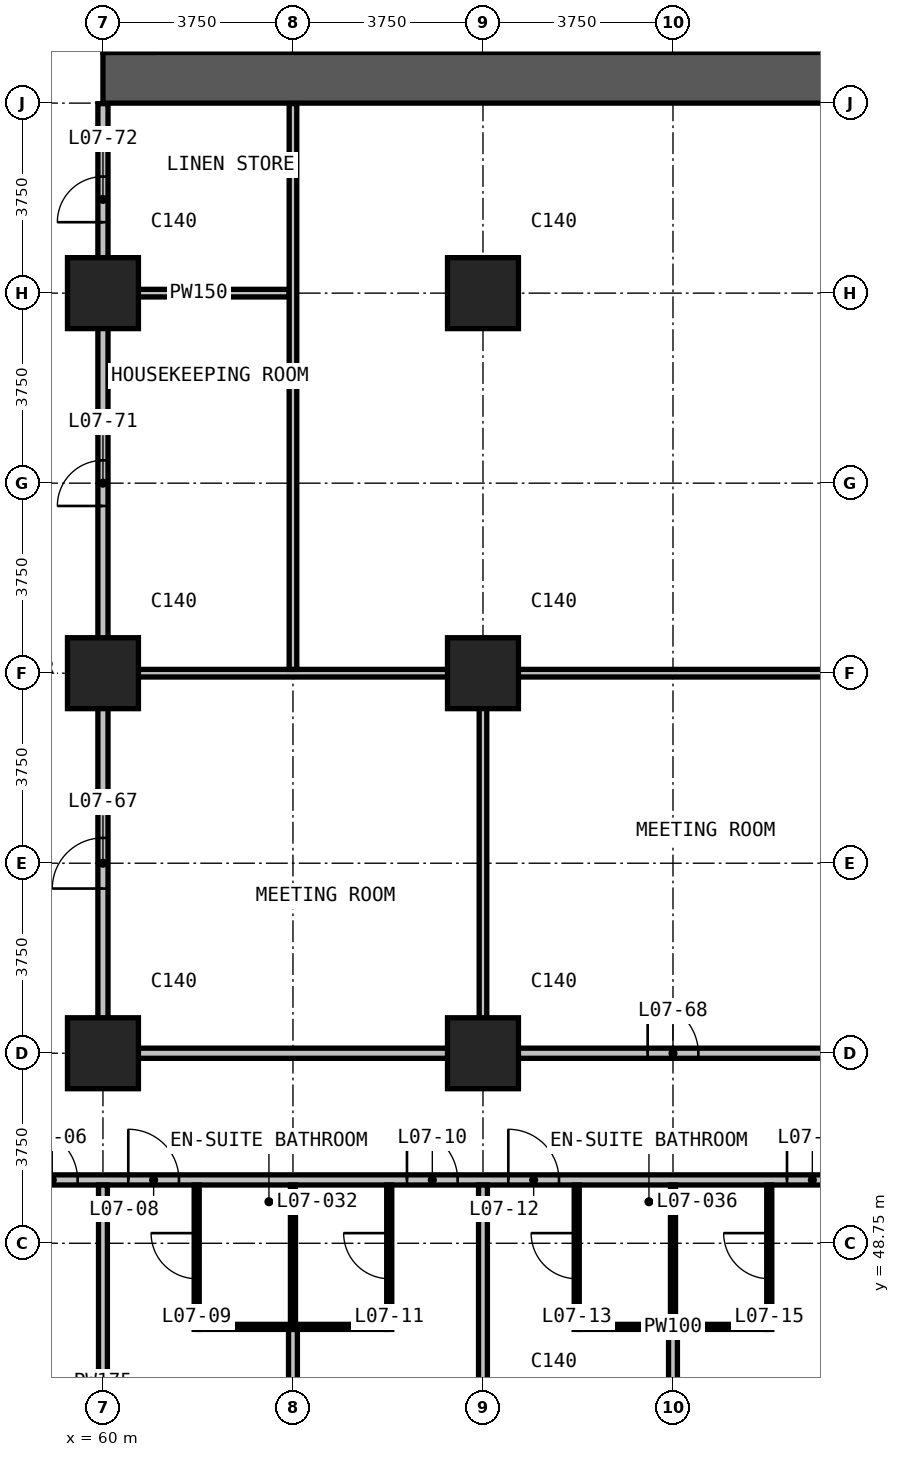
"""IFC4 building model, lengths in metres.
Left out: names, types, materials, properties, quantities, classifications, styles, units other than length and angle.
Written with IfcOpenShell. Run it as: python <this file> out.ifc"""

import sys

from ifc_helpers import new_model, si_unit, direction, frame, frame_2d, origin, origin_2d, place, context, subcontext, project, spatial, rectangle, extrude, element, fill, save


model = new_model("IFC4")
c1 = context("Model", 3, precision=1e-05, world=origin(), true_north=direction((0.0, 1.0)))
c2 = subcontext(c1, "Body", "Model", "MODEL_VIEW")
j1 = project(units=[si_unit("LENGTHUNIT", "METRE"), si_unit("PLANEANGLEUNIT", "RADIAN")], contexts=[c1])
p1 = place(None, origin())
s1 = spatial("IfcSite", under=j1, at=p1, CompositionType="ELEMENT")
p2 = place(p1, origin())
s2 = spatial("IfcBuilding", under=s1, at=p2, CompositionType="ELEMENT")
p3 = place(p2, frame((0.0, 0.0, 42.8)))
s3 = spatial("IfcBuildingStorey", under=s2, at=p3, CompositionType="ELEMENT", Elevation=42.8)
for number, where, z_axis, x_axis in (
    (1, (60.0, 52.5, 0.0), (0.0, 0.0, 1.0), (1.0, 0.0, 0.0)),
    (2, (60.0, 60.0, 0.0), (0.0, 0.0, 1.0), (1.0, 0.0, 0.0)),
    (3, (60.0, 67.5, 0.0), (0.0, 0.0, 1.0), (1.0, 0.0, 0.0)),
    (4, (67.5, 52.5, 0.0), (0.0, 0.0, 1.0), (1.0, 0.0, 0.0)),
    (5, (67.5, 60.0, 0.0), (0.0, 0.0, 1.0), (1.0, 0.0, 0.0)),
    (6, (67.5, 67.5, 0.0), (0.0, 0.0, 1.0), (1.0, 0.0, 0.0)),
):
    element("IfcColumn", number, at=place(p3, frame(where, z_axis=z_axis, x_axis=x_axis)), inside=s3, PredefinedType="COLUMN", context=c2, shape_type="SweptSolid", body=[
        extrude(rectangle(XDim=1.4, YDim=1.4, at=origin_2d()), origin(), (0.0, 0.0, 1.0), 3.3),
    ])
p4 = place(p3, frame((60.0, 71.75, 0.0), z_axis=(0.0, 0.0, 1.0), x_axis=(1.0, 0.0, 0.0)))
e7 = element("IfcWall", 7, at=p4, inside=s3, PredefinedType="SHEAR", context=c2, shape_type="SweptSolid", body=[
    extrude(rectangle(XDim=30.0, YDim=1.0, at=frame_2d((15.0, 0.0))), origin(), (0.0, 0.0, 1.0), 3.3),
])
p5 = place(p3, frame((52.575, 50.0, 0.0), z_axis=(0.0, 0.0, 1.0), x_axis=(1.0, 0.0, 0.0)))
e8 = element("IfcWall", 8, at=p5, inside=s3, PredefinedType="PARTITIONING", context=c2, shape_type="SweptSolid", body=[
    extrude(rectangle(XDim=44.85, YDim=0.2, at=frame_2d((22.425, 0.0))), origin(), (0.0, 0.0, 1.0), 3.0),
])
p6 = place(p5, frame((5.925, 0.0, 0.0)))
e9 = element("IfcOpeningElement", 9, at=p6, cuts=e8, PredefinedType="OPENING", context=c2, shape_type="SweptSolid", body=[
    extrude(rectangle(XDim=1.0, YDim=2.2, at=frame_2d((0.5, 1.1))), frame((0.0, 0.11, 0.0), z_axis=(0.0, -1.0, 0.0), x_axis=(1.0, 0.0, 0.0)), (0.0, 0.0, 1.0), 0.22),
])
p7 = place(p5, frame((7.925, 0.0, 0.0)))
e10 = element("IfcOpeningElement", 10, at=p7, cuts=e8, PredefinedType="OPENING", context=c2, shape_type="SweptSolid", body=[
    extrude(rectangle(XDim=1.0, YDim=2.2, at=frame_2d((0.5, 1.1))), frame((0.0, 0.11, 0.0), z_axis=(0.0, -1.0, 0.0), x_axis=(1.0, 0.0, 0.0)), (0.0, 0.0, 1.0), 0.22),
])
p8 = place(p5, frame((13.425, 0.0, 0.0)))
e11 = element("IfcOpeningElement", 11, at=p8, cuts=e8, PredefinedType="OPENING", context=c2, shape_type="SweptSolid", body=[
    extrude(rectangle(XDim=1.0, YDim=2.2, at=frame_2d((0.5, 1.1))), frame((0.0, 0.11, 0.0), z_axis=(0.0, -1.0, 0.0), x_axis=(1.0, 0.0, 0.0)), (0.0, 0.0, 1.0), 0.22),
])
p9 = place(p5, frame((15.425, 0.0, 0.0)))
e12 = element("IfcOpeningElement", 12, at=p9, cuts=e8, PredefinedType="OPENING", context=c2, shape_type="SweptSolid", body=[
    extrude(rectangle(XDim=1.0, YDim=2.2, at=frame_2d((0.5, 1.1))), frame((0.0, 0.11, 0.0), z_axis=(0.0, -1.0, 0.0), x_axis=(1.0, 0.0, 0.0)), (0.0, 0.0, 1.0), 0.22),
])
p10 = place(p5, frame((20.925, 0.0, 0.0)))
e13 = element("IfcOpeningElement", 13, at=p10, cuts=e8, PredefinedType="OPENING", context=c2, shape_type="SweptSolid", body=[
    extrude(rectangle(XDim=1.0, YDim=2.2, at=frame_2d((0.5, 1.1))), frame((0.0, 0.11, 0.0), z_axis=(0.0, -1.0, 0.0), x_axis=(1.0, 0.0, 0.0)), (0.0, 0.0, 1.0), 0.22),
])
p11 = place(p5, frame((22.925, 0.0, 0.0)))
e14 = element("IfcOpeningElement", 14, at=p11, cuts=e8, PredefinedType="OPENING", context=c2, shape_type="SweptSolid", body=[
    extrude(rectangle(XDim=1.0, YDim=2.2, at=frame_2d((0.5, 1.1))), frame((0.0, 0.11, 0.0), z_axis=(0.0, -1.0, 0.0), x_axis=(1.0, 0.0, 0.0)), (0.0, 0.0, 1.0), 0.22),
])
p12 = place(p5, frame((28.425, 0.0, 0.0)))
e15 = element("IfcOpeningElement", 15, at=p12, cuts=e8, PredefinedType="OPENING", context=c2, shape_type="SweptSolid", body=[
    extrude(rectangle(XDim=1.0, YDim=2.2, at=frame_2d((0.5, 1.1))), frame((0.0, 0.11, 0.0), z_axis=(0.0, -1.0, 0.0), x_axis=(1.0, 0.0, 0.0)), (0.0, 0.0, 1.0), 0.22),
])
p13 = place(p5, frame((30.425, 0.0, 0.0)))
e16 = element("IfcOpeningElement", 16, at=p13, cuts=e8, PredefinedType="OPENING", context=c2, shape_type="SweptSolid", body=[
    extrude(rectangle(XDim=1.0, YDim=2.2, at=frame_2d((0.5, 1.1))), frame((0.0, 0.11, 0.0), z_axis=(0.0, -1.0, 0.0), x_axis=(1.0, 0.0, 0.0)), (0.0, 0.0, 1.0), 0.22),
])
p14 = place(p5, frame((35.925, 0.0, 0.0)))
e17 = element("IfcOpeningElement", 17, at=p14, cuts=e8, PredefinedType="OPENING", context=c2, shape_type="SweptSolid", body=[
    extrude(rectangle(XDim=1.0, YDim=2.2, at=frame_2d((0.5, 1.1))), frame((0.0, 0.11, 0.0), z_axis=(0.0, -1.0, 0.0), x_axis=(1.0, 0.0, 0.0)), (0.0, 0.0, 1.0), 0.22),
])
p15 = place(p5, frame((37.925, 0.0, 0.0)))
e18 = element("IfcOpeningElement", 18, at=p15, cuts=e8, PredefinedType="OPENING", context=c2, shape_type="SweptSolid", body=[
    extrude(rectangle(XDim=1.0, YDim=2.2, at=frame_2d((0.5, 1.1))), frame((0.0, 0.11, 0.0), z_axis=(0.0, -1.0, 0.0), x_axis=(1.0, 0.0, 0.0)), (0.0, 0.0, 1.0), 0.22),
])
p16 = place(p5, frame((1.4, 0.0, 0.0)))
e19 = element("IfcOpeningElement", 19, at=p16, cuts=e8, PredefinedType="OPENING", context=c2, shape_type="SweptSolid", body=[
    extrude(rectangle(XDim=0.9, YDim=2.2, at=frame_2d((0.45, 1.1))), frame((0.0, 0.11, 0.0), z_axis=(0.0, -1.0, 0.0), x_axis=(1.0, 0.0, 0.0)), (0.0, 0.0, 1.0), 0.22),
])
p17 = place(p5, frame((42.575, 0.0, 0.0)))
e20 = element("IfcOpeningElement", 20, at=p17, cuts=e8, PredefinedType="OPENING", context=c2, shape_type="SweptSolid", body=[
    extrude(rectangle(XDim=0.9, YDim=2.2, at=frame_2d((0.45, 1.1))), frame((0.0, 0.11, 0.0), z_axis=(0.0, -1.0, 0.0), x_axis=(1.0, 0.0, 0.0)), (0.0, 0.0, 1.0), 0.22),
])
p18 = place(p3, frame((60.1, 52.5, 0.0), z_axis=(0.0, 0.0, 1.0), x_axis=(1.0, 0.0, 0.0)))
e21 = element("IfcWall", 21, at=p18, inside=s3, PredefinedType="PARTITIONING", context=c2, shape_type="SweptSolid", body=[
    extrude(rectangle(XDim=29.8, YDim=0.2, at=frame_2d((14.9, 0.0))), origin(), (0.0, 0.0, 1.0), 3.0),
])
p19 = place(p18, frame((10.65, 0.0, 0.0)))
e22 = element("IfcOpeningElement", 22, at=p19, cuts=e21, PredefinedType="OPENING", context=c2, shape_type="SweptSolid", body=[
    extrude(rectangle(XDim=1.0, YDim=2.2, at=frame_2d((0.5, 1.1))), frame((0.0, 0.11, 0.0), z_axis=(0.0, -1.0, 0.0), x_axis=(1.0, 0.0, 0.0)), (0.0, 0.0, 1.0), 0.22),
])
p20 = place(p18, frame((18.15, 0.0, 0.0)))
e23 = element("IfcOpeningElement", 23, at=p20, cuts=e21, PredefinedType="OPENING", context=c2, shape_type="SweptSolid", body=[
    extrude(rectangle(XDim=1.0, YDim=2.2, at=frame_2d((0.5, 1.1))), frame((0.0, 0.11, 0.0), z_axis=(0.0, -1.0, 0.0), x_axis=(1.0, 0.0, 0.0)), (0.0, 0.0, 1.0), 0.22),
])
p21 = place(p3, frame((60.0, 52.4, 0.0), z_axis=(0.0, 0.0, 1.0), x_axis=(0.0, 1.0, 0.0)))
e24 = element("IfcWall", 24, at=p21, inside=s3, PredefinedType="PARTITIONING", context=c2, shape_type="SweptSolid", body=[
    extrude(rectangle(XDim=18.84, YDim=0.2, at=frame_2d((9.42, 0.0))), origin(), (0.0, 0.0, 1.0), 3.0),
])
p22 = place(p21, frame((3.35, 0.0, 0.0)))
e25 = element("IfcOpeningElement", 25, at=p22, cuts=e24, PredefinedType="OPENING", context=c2, shape_type="SweptSolid", body=[
    extrude(rectangle(XDim=1.0, YDim=2.2, at=frame_2d((0.5, 1.1))), frame((0.0, 0.11, 0.0), z_axis=(0.0, -1.0, 0.0), x_axis=(1.0, 0.0, 0.0)), (0.0, 0.0, 1.0), 0.22),
])
p23 = place(p21, frame((10.9, 0.0, 0.0)))
e26 = element("IfcOpeningElement", 26, at=p23, cuts=e24, PredefinedType="OPENING", context=c2, shape_type="SweptSolid", body=[
    extrude(rectangle(XDim=0.9, YDim=2.2, at=frame_2d((0.45, 1.1))), frame((0.0, 0.11, 0.0), z_axis=(0.0, -1.0, 0.0), x_axis=(1.0, 0.0, 0.0)), (0.0, 0.0, 1.0), 0.22),
])
p24 = place(p21, frame((16.5, 0.0, 0.0)))
e27 = element("IfcOpeningElement", 27, at=p24, cuts=e24, PredefinedType="OPENING", context=c2, shape_type="SweptSolid", body=[
    extrude(rectangle(XDim=0.9, YDim=2.2, at=frame_2d((0.45, 1.1))), frame((0.0, 0.11, 0.0), z_axis=(0.0, -1.0, 0.0), x_axis=(1.0, 0.0, 0.0)), (0.0, 0.0, 1.0), 0.22),
])
p25 = place(p3, frame((60.0, 40.485, 0.0), z_axis=(0.0, 0.0, 1.0), x_axis=(0.0, 1.0, 0.0)))
e28 = element("IfcWall", 28, at=p25, inside=s3, PredefinedType="PARTITIONING", context=c2, shape_type="SweptSolid", body=[
    extrude(rectangle(XDim=9.415, YDim=0.175, at=frame_2d((4.708, 0.0))), origin(), (0.0, 0.0, 1.0), 3.0),
])
p26 = place(p3, frame((63.75, 40.485, 0.0), z_axis=(0.0, 0.0, 1.0), x_axis=(0.0, 1.0, 0.0)))
e29 = element("IfcWall", 29, at=p26, inside=s3, PredefinedType="PARTITIONING", context=c2, shape_type="SweptSolid", body=[
    extrude(rectangle(XDim=6.565, YDim=0.175, at=frame_2d((3.282, 0.0))), origin(), (0.0, 0.0, 1.0), 3.0),
])
p27 = place(p3, frame((67.5, 40.485, 0.0), z_axis=(0.0, 0.0, 1.0), x_axis=(0.0, 1.0, 0.0)))
e30 = element("IfcWall", 30, at=p27, inside=s3, PredefinedType="PARTITIONING", context=c2, shape_type="SweptSolid", body=[
    extrude(rectangle(XDim=9.415, YDim=0.175, at=frame_2d((4.708, 0.0))), origin(), (0.0, 0.0, 1.0), 3.0),
])
p28 = place(p3, frame((71.25, 40.485, 0.0), z_axis=(0.0, 0.0, 1.0), x_axis=(0.0, 1.0, 0.0)))
e31 = element("IfcWall", 31, at=p28, inside=s3, PredefinedType="PARTITIONING", context=c2, shape_type="SweptSolid", body=[
    extrude(rectangle(XDim=6.565, YDim=0.175, at=frame_2d((3.282, 0.0))), origin(), (0.0, 0.0, 1.0), 3.0),
])
p29 = place(p3, frame((60.1, 60.0, 0.0), z_axis=(0.0, 0.0, 1.0), x_axis=(1.0, 0.0, 0.0)))
e32 = element("IfcWall", 32, at=p29, inside=s3, PredefinedType="PARTITIONING", context=c2, shape_type="SweptSolid", body=[
    extrude(rectangle(XDim=29.8, YDim=0.15, at=frame_2d((14.9, 0.0))), origin(), (0.0, 0.0, 1.0), 3.0),
])
p30 = place(p3, frame((60.1, 67.5, 0.0), z_axis=(0.0, 0.0, 1.0), x_axis=(1.0, 0.0, 0.0)))
e33 = element("IfcWall", 33, at=p30, inside=s3, PredefinedType="PARTITIONING", context=c2, shape_type="SweptSolid", body=[
    extrude(rectangle(XDim=3.575, YDim=0.15, at=frame_2d((1.788, 0.0))), origin(), (0.0, 0.0, 1.0), 3.0),
])
p31 = place(p3, frame((63.75, 60.075, 0.0), z_axis=(0.0, 0.0, 1.0), x_axis=(0.0, 1.0, 0.0)))
e34 = element("IfcWall", 34, at=p31, inside=s3, PredefinedType="PARTITIONING", context=c2, shape_type="SweptSolid", body=[
    extrude(rectangle(XDim=11.165, YDim=0.15, at=frame_2d((5.583, 0.0))), origin(), (0.0, 0.0, 1.0), 3.0),
])
p32 = place(p3, frame((67.5, 52.6, 0.0), z_axis=(0.0, 0.0, 1.0), x_axis=(0.0, 1.0, 0.0)))
e35 = element("IfcWall", 35, at=p32, inside=s3, PredefinedType="PARTITIONING", context=c2, shape_type="SweptSolid", body=[
    extrude(rectangle(XDim=7.325, YDim=0.15, at=frame_2d((3.663, 0.0))), origin(), (0.0, 0.0, 1.0), 3.0),
])
for number, where, z_axis, x_axis in (
    (36, (61.9, 47.1, 0.0), (0.0, 0.0, 1.0), (1.0, 0.0, 0.0)),
    (37, (69.4, 47.1, 0.0), (0.0, 0.0, 1.0), (1.0, 0.0, 0.0)),
):
    element("IfcWall", number, at=place(p3, frame(where, z_axis=z_axis, x_axis=x_axis)), inside=s3, PredefinedType="PARTITIONING", context=c2, shape_type="SweptSolid", body=[
        extrude(rectangle(XDim=3.7, YDim=0.1, at=frame_2d((1.85, 0.0))), origin(), (0.0, 0.0, 1.0), 3.0),
    ])
p33 = place(p3, frame((61.85, 47.05, 0.0), z_axis=(0.0, 0.0, 1.0), x_axis=(0.0, 1.0, 0.0)))
e38 = element("IfcWall", 38, at=p33, inside=s3, PredefinedType="PARTITIONING", context=c2, shape_type="SweptSolid", body=[
    extrude(rectangle(XDim=2.85, YDim=0.1, at=frame_2d((1.425, 0.0))), origin(), (0.0, 0.0, 1.0), 3.0),
])
p34 = place(p33, frame((1.0, 0.0, 0.0)))
e39 = element("IfcOpeningElement", 39, at=p34, cuts=e38, PredefinedType="OPENING", context=c2, shape_type="SweptSolid", body=[
    extrude(rectangle(XDim=0.9, YDim=2.2, at=frame_2d((0.45, 1.1))), frame((0.0, 0.06, 0.0), z_axis=(0.0, -1.0, 0.0), x_axis=(1.0, 0.0, 0.0)), (0.0, 0.0, 1.0), 0.12),
])
p35 = place(p3, frame((63.75, 47.15, 0.0), z_axis=(0.0, 0.0, 1.0), x_axis=(0.0, 1.0, 0.0)))
e40 = element("IfcWall", 40, at=p35, inside=s3, PredefinedType="PARTITIONING", context=c2, shape_type="SweptSolid", body=[
    extrude(rectangle(XDim=2.75, YDim=0.1, at=frame_2d((1.375, 0.0))), origin(), (0.0, 0.0, 1.0), 3.0),
])
p36 = place(p3, frame((65.65, 47.05, 0.0), z_axis=(0.0, 0.0, 1.0), x_axis=(0.0, 1.0, 0.0)))
e41 = element("IfcWall", 41, at=p36, inside=s3, PredefinedType="PARTITIONING", context=c2, shape_type="SweptSolid", body=[
    extrude(rectangle(XDim=2.85, YDim=0.1, at=frame_2d((1.425, 0.0))), origin(), (0.0, 0.0, 1.0), 3.0),
])
p37 = place(p36, frame((1.0, 0.0, 0.0)))
e42 = element("IfcOpeningElement", 42, at=p37, cuts=e41, PredefinedType="OPENING", context=c2, shape_type="SweptSolid", body=[
    extrude(rectangle(XDim=0.9, YDim=2.2, at=frame_2d((0.45, 1.1))), frame((0.0, 0.06, 0.0), z_axis=(0.0, -1.0, 0.0), x_axis=(1.0, 0.0, 0.0)), (0.0, 0.0, 1.0), 0.12),
])
p38 = place(p3, frame((69.35, 47.05, 0.0), z_axis=(0.0, 0.0, 1.0), x_axis=(0.0, 1.0, 0.0)))
e43 = element("IfcWall", 43, at=p38, inside=s3, PredefinedType="PARTITIONING", context=c2, shape_type="SweptSolid", body=[
    extrude(rectangle(XDim=2.85, YDim=0.1, at=frame_2d((1.425, 0.0))), origin(), (0.0, 0.0, 1.0), 3.0),
])
p39 = place(p38, frame((1.0, 0.0, 0.0)))
e44 = element("IfcOpeningElement", 44, at=p39, cuts=e43, PredefinedType="OPENING", context=c2, shape_type="SweptSolid", body=[
    extrude(rectangle(XDim=0.9, YDim=2.2, at=frame_2d((0.45, 1.1))), frame((0.0, 0.06, 0.0), z_axis=(0.0, -1.0, 0.0), x_axis=(1.0, 0.0, 0.0)), (0.0, 0.0, 1.0), 0.12),
])
p40 = place(p3, frame((71.25, 47.15, 0.0), z_axis=(0.0, 0.0, 1.0), x_axis=(0.0, 1.0, 0.0)))
e45 = element("IfcWall", 45, at=p40, inside=s3, PredefinedType="PARTITIONING", context=c2, shape_type="SweptSolid", body=[
    extrude(rectangle(XDim=2.75, YDim=0.1, at=frame_2d((1.375, 0.0))), origin(), (0.0, 0.0, 1.0), 3.0),
])
p41 = place(p3, frame((73.15, 47.05, 0.0), z_axis=(0.0, 0.0, 1.0), x_axis=(0.0, 1.0, 0.0)))
e46 = element("IfcWall", 46, at=p41, inside=s3, PredefinedType="PARTITIONING", context=c2, shape_type="SweptSolid", body=[
    extrude(rectangle(XDim=2.85, YDim=0.1, at=frame_2d((1.425, 0.0))), origin(), (0.0, 0.0, 1.0), 3.0),
])
p42 = place(p41, frame((1.0, 0.0, 0.0)))
e47 = element("IfcOpeningElement", 47, at=p42, cuts=e46, PredefinedType="OPENING", context=c2, shape_type="SweptSolid", body=[
    extrude(rectangle(XDim=0.9, YDim=2.2, at=frame_2d((0.45, 1.1))), frame((0.0, 0.06, 0.0), z_axis=(0.0, -1.0, 0.0), x_axis=(1.0, 0.0, 0.0)), (0.0, 0.0, 1.0), 0.12),
])
p43 = place(p6, origin())
e48 = element("IfcDoor", 48, at=p43, inside=s3, OperationType="SINGLE_SWING_LEFT", PredefinedType="DOOR", context=c2, shape_type="SweptSolid", body=[
    extrude(rectangle(XDim=1.0, YDim=2.2, at=frame_2d((0.5, 1.1))), frame((0.0, 0.025, 0.0), z_axis=(0.0, -1.0, 0.0), x_axis=(1.0, 0.0, 0.0)), (0.0, 0.0, 1.0), 0.05),
])
fill(e9, e48)
p44 = place(p7, origin())
e49 = element("IfcDoor", 49, at=p44, inside=s3, OperationType="SINGLE_SWING_LEFT", PredefinedType="DOOR", context=c2, shape_type="SweptSolid", body=[
    extrude(rectangle(XDim=1.0, YDim=2.2, at=frame_2d((0.5, 1.1))), frame((0.0, 0.025, 0.0), z_axis=(0.0, -1.0, 0.0), x_axis=(1.0, 0.0, 0.0)), (0.0, 0.0, 1.0), 0.05),
])
fill(e10, e49)
p45 = place(p34, origin())
e50 = element("IfcDoor", 50, at=p45, inside=s3, OperationType="SINGLE_SWING_RIGHT", PredefinedType="DOOR", context=c2, shape_type="SweptSolid", body=[
    extrude(rectangle(XDim=0.9, YDim=2.2, at=frame_2d((0.45, 1.1))), frame((0.0, 0.025, 0.0), z_axis=(0.0, -1.0, 0.0), x_axis=(1.0, 0.0, 0.0)), (0.0, 0.0, 1.0), 0.05),
])
fill(e39, e50)
p46 = place(p8, origin())
e51 = element("IfcDoor", 51, at=p46, inside=s3, OperationType="SINGLE_SWING_LEFT", PredefinedType="DOOR", context=c2, shape_type="SweptSolid", body=[
    extrude(rectangle(XDim=1.0, YDim=2.2, at=frame_2d((0.5, 1.1))), frame((0.0, 0.025, 0.0), z_axis=(0.0, -1.0, 0.0), x_axis=(1.0, 0.0, 0.0)), (0.0, 0.0, 1.0), 0.05),
])
fill(e11, e51)
p47 = place(p37, origin())
e52 = element("IfcDoor", 52, at=p47, inside=s3, OperationType="SINGLE_SWING_RIGHT", PredefinedType="DOOR", context=c2, shape_type="SweptSolid", body=[
    extrude(rectangle(XDim=0.9, YDim=2.2, at=frame_2d((0.45, 1.1))), frame((0.0, 0.025, 0.0), z_axis=(0.0, -1.0, 0.0), x_axis=(1.0, 0.0, 0.0)), (0.0, 0.0, 1.0), 0.05),
])
fill(e42, e52)
p48 = place(p9, origin())
e53 = element("IfcDoor", 53, at=p48, inside=s3, OperationType="SINGLE_SWING_LEFT", PredefinedType="DOOR", context=c2, shape_type="SweptSolid", body=[
    extrude(rectangle(XDim=1.0, YDim=2.2, at=frame_2d((0.5, 1.1))), frame((0.0, 0.025, 0.0), z_axis=(0.0, -1.0, 0.0), x_axis=(1.0, 0.0, 0.0)), (0.0, 0.0, 1.0), 0.05),
])
fill(e12, e53)
p49 = place(p39, origin())
e54 = element("IfcDoor", 54, at=p49, inside=s3, OperationType="SINGLE_SWING_RIGHT", PredefinedType="DOOR", context=c2, shape_type="SweptSolid", body=[
    extrude(rectangle(XDim=0.9, YDim=2.2, at=frame_2d((0.45, 1.1))), frame((0.0, 0.025, 0.0), z_axis=(0.0, -1.0, 0.0), x_axis=(1.0, 0.0, 0.0)), (0.0, 0.0, 1.0), 0.05),
])
fill(e44, e54)
p50 = place(p10, origin())
e55 = element("IfcDoor", 55, at=p50, inside=s3, OperationType="SINGLE_SWING_LEFT", PredefinedType="DOOR", context=c2, shape_type="SweptSolid", body=[
    extrude(rectangle(XDim=1.0, YDim=2.2, at=frame_2d((0.5, 1.1))), frame((0.0, 0.025, 0.0), z_axis=(0.0, -1.0, 0.0), x_axis=(1.0, 0.0, 0.0)), (0.0, 0.0, 1.0), 0.05),
])
fill(e13, e55)
p51 = place(p42, origin())
e56 = element("IfcDoor", 56, at=p51, inside=s3, OperationType="SINGLE_SWING_RIGHT", PredefinedType="DOOR", context=c2, shape_type="SweptSolid", body=[
    extrude(rectangle(XDim=0.9, YDim=2.2, at=frame_2d((0.45, 1.1))), frame((0.0, 0.025, 0.0), z_axis=(0.0, -1.0, 0.0), x_axis=(1.0, 0.0, 0.0)), (0.0, 0.0, 1.0), 0.05),
])
fill(e47, e56)
p52 = place(p22, origin())
e57 = element("IfcDoor", 57, at=p52, inside=s3, OperationType="SINGLE_SWING_LEFT", PredefinedType="DOOR", context=c2, shape_type="SweptSolid", body=[
    extrude(rectangle(XDim=1.0, YDim=2.2, at=frame_2d((0.5, 1.1))), frame((0.0, 0.025, 0.0), z_axis=(0.0, -1.0, 0.0), x_axis=(1.0, 0.0, 0.0)), (0.0, 0.0, 1.0), 0.05),
])
fill(e25, e57)
p53 = place(p19, origin())
e58 = element("IfcDoor", 58, at=p53, inside=s3, OperationType="SINGLE_SWING_LEFT", PredefinedType="DOOR", context=c2, shape_type="SweptSolid", body=[
    extrude(rectangle(XDim=1.0, YDim=2.2, at=frame_2d((0.5, 1.1))), frame((0.0, 0.025, 0.0), z_axis=(0.0, -1.0, 0.0), x_axis=(1.0, 0.0, 0.0)), (0.0, 0.0, 1.0), 0.05),
])
fill(e22, e58)
p54 = place(p23, origin())
e59 = element("IfcDoor", 59, at=p54, inside=s3, OperationType="SINGLE_SWING_LEFT", PredefinedType="DOOR", context=c2, shape_type="SweptSolid", body=[
    extrude(rectangle(XDim=0.9, YDim=2.2, at=frame_2d((0.45, 1.1))), frame((0.0, 0.025, 0.0), z_axis=(0.0, -1.0, 0.0), x_axis=(1.0, 0.0, 0.0)), (0.0, 0.0, 1.0), 0.05),
])
fill(e26, e59)
p55 = place(p24, origin())
e60 = element("IfcDoor", 60, at=p55, inside=s3, OperationType="SINGLE_SWING_LEFT", PredefinedType="DOOR", context=c2, shape_type="SweptSolid", body=[
    extrude(rectangle(XDim=0.9, YDim=2.2, at=frame_2d((0.45, 1.1))), frame((0.0, 0.025, 0.0), z_axis=(0.0, -1.0, 0.0), x_axis=(1.0, 0.0, 0.0)), (0.0, 0.0, 1.0), 0.05),
])
fill(e27, e60)
save(model, sys.argv[1])
